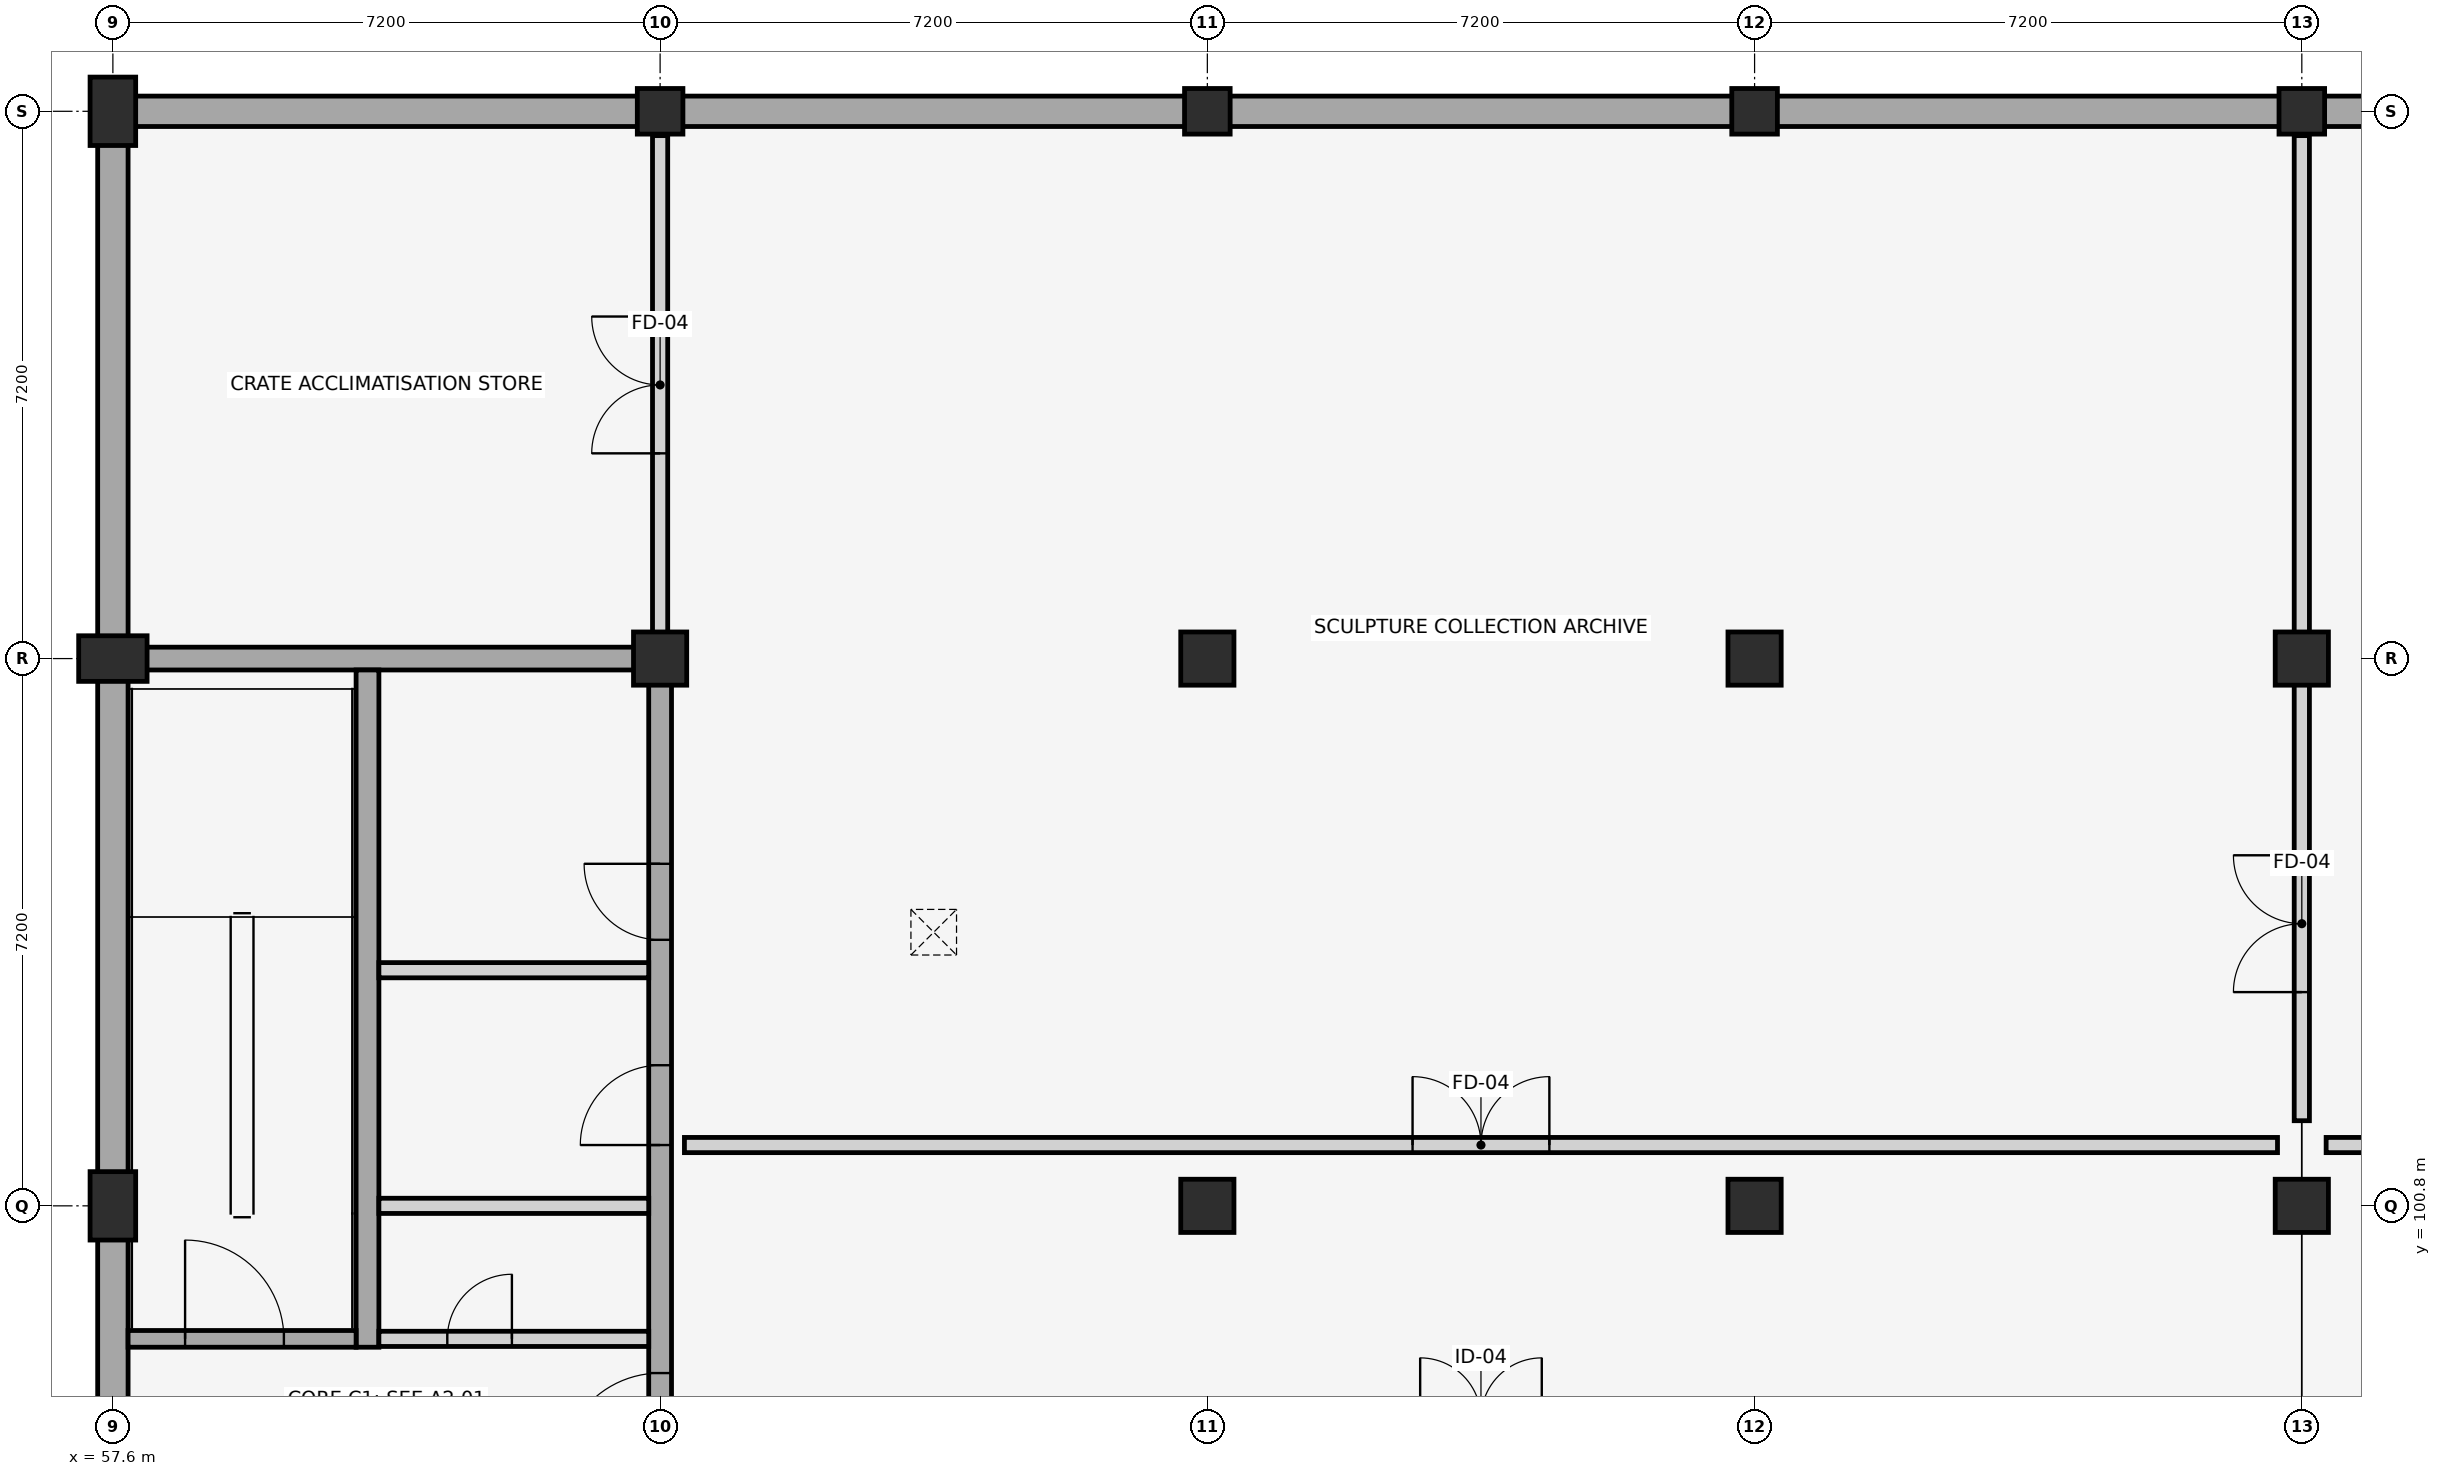
"""IFC4 building model, lengths in metres.
Left out: names, types, materials, properties, quantities, classifications, styles, units other than length and angle.
Written with IfcOpenShell. Run it as: python <this file> out.ifc"""

import sys

from ifc_helpers import new_model, si_unit, direction, frame, frame_2d, origin, origin_2d, place, context, subcontext, project, spatial, rectangle, extrude, element, fill, save


model = new_model("IFC4")
c1 = context("Model", 3, precision=1e-05, world=origin(), true_north=direction((0.0, 1.0)))
c2 = subcontext(c1, "Body", "Model", "MODEL_VIEW")
j1 = project(units=[si_unit("LENGTHUNIT", "METRE"), si_unit("PLANEANGLEUNIT", "RADIAN")], contexts=[c1])
p1 = place(None, origin())
s1 = spatial("IfcSite", under=j1, at=p1, CompositionType="ELEMENT")
p2 = place(p1, origin())
s2 = spatial("IfcBuilding", under=s1, at=p2, CompositionType="ELEMENT")
p3 = place(p2, frame((0.0, 0.0, -4.5)))
s3 = spatial("IfcBuildingStorey", under=s2, at=p3, CompositionType="ELEMENT", Elevation=-4.5)
p4 = place(p3, frame((108.2, 115.2, 0.0), z_axis=(0.0, 0.0, 1.0), x_axis=(-1.0, 0.0, 0.0)))
e1 = element("IfcWall", 1, at=p4, inside=s3, PredefinedType="USERDEFINED", context=c2, shape_type="SweptSolid", body=[
    extrude(rectangle(XDim=50.8, YDim=0.4, at=frame_2d((25.4, 0.0))), origin(), (0.0, 0.0, 1.0), 3.67),
])
p5 = place(p3, frame((57.6, 115.0, 0.0), z_axis=(0.0, 0.0, 1.0), x_axis=(0.0, -1.0, 0.0)))
e2 = element("IfcWall", 2, at=p5, inside=s3, PredefinedType="USERDEFINED", context=c2, shape_type="SweptSolid", body=[
    extrude(rectangle(XDim=28.4, YDim=0.4, at=frame_2d((14.2, 0.0))), origin(), (0.0, 0.0, 1.0), 3.67),
])
for number, where, z_axis, x_axis in (
    (3, (57.6, 100.8, -0.45), (0.0, 0.0, 1.0), (1.0, 0.0, 0.0)),
    (4, (57.6, 108.0, -0.45), (0.0, 0.0, 1.0), (0.0, 1.0, 0.0)),
    (5, (57.6, 115.2, -0.45), (0.0, 0.0, 1.0), (1.0, 0.0, 0.0)),
):
    element("IfcColumn", number, at=place(p3, frame(where, z_axis=z_axis, x_axis=x_axis)), inside=s3, PredefinedType="PILASTER", context=c2, shape_type="SweptSolid", body=[
        extrude(rectangle(XDim=0.6, YDim=0.9, at=origin_2d()), origin(), (0.0, 0.0, 1.0), 4.95),
    ])
p6 = place(p3, frame((64.8, 108.0, -0.45), z_axis=(0.0, 0.0, 1.0), x_axis=(1.0, 0.0, 0.0)))
e6 = element("IfcColumn", 6, at=p6, inside=s3, PredefinedType="COLUMN", context=c2, shape_type="SweptSolid", body=[
    extrude(rectangle(XDim=0.7, YDim=0.7, at=origin_2d()), origin(), (0.0, 0.0, 1.0), 4.95),
])
p7 = place(p3, frame((64.8, 115.2, -0.45), z_axis=(0.0, 0.0, 1.0), x_axis=(0.0, 1.0, 0.0)))
e7 = element("IfcColumn", 7, at=p7, inside=s3, PredefinedType="COLUMN", context=c2, shape_type="SweptSolid", body=[
    extrude(rectangle(XDim=0.6, YDim=0.6, at=origin_2d()), origin(), (0.0, 0.0, 1.0), 4.95),
])
for number, where, z_axis, x_axis in (
    (8, (72.0, 100.8, -0.45), (0.0, 0.0, 1.0), (1.0, 0.0, 0.0)),
    (9, (72.0, 108.0, -0.45), (0.0, 0.0, 1.0), (0.0, 1.0, 0.0)),
):
    element("IfcColumn", number, at=place(p3, frame(where, z_axis=z_axis, x_axis=x_axis)), inside=s3, PredefinedType="COLUMN", context=c2, shape_type="SweptSolid", body=[
        extrude(rectangle(XDim=0.7, YDim=0.7, at=origin_2d()), origin(), (0.0, 0.0, 1.0), 4.95),
    ])
p8 = place(p3, frame((72.0, 115.2, -0.45), z_axis=(0.0, 0.0, 1.0), x_axis=(1.0, 0.0, 0.0)))
e10 = element("IfcColumn", 10, at=p8, inside=s3, PredefinedType="COLUMN", context=c2, shape_type="SweptSolid", body=[
    extrude(rectangle(XDim=0.6, YDim=0.6, at=origin_2d()), origin(), (0.0, 0.0, 1.0), 4.95),
])
for number, where, z_axis, x_axis in (
    (11, (79.2, 100.8, -0.45), (0.0, 0.0, 1.0), (0.0, 1.0, 0.0)),
    (12, (79.2, 108.0, -0.45), (0.0, 0.0, 1.0), (1.0, 0.0, 0.0)),
):
    element("IfcColumn", number, at=place(p3, frame(where, z_axis=z_axis, x_axis=x_axis)), inside=s3, PredefinedType="COLUMN", context=c2, shape_type="SweptSolid", body=[
        extrude(rectangle(XDim=0.7, YDim=0.7, at=origin_2d()), origin(), (0.0, 0.0, 1.0), 4.95),
    ])
p9 = place(p3, frame((79.2, 115.2, -0.45), z_axis=(0.0, 0.0, 1.0), x_axis=(0.0, 1.0, 0.0)))
e13 = element("IfcColumn", 13, at=p9, inside=s3, PredefinedType="COLUMN", context=c2, shape_type="SweptSolid", body=[
    extrude(rectangle(XDim=0.6, YDim=0.6, at=origin_2d()), origin(), (0.0, 0.0, 1.0), 4.95),
])
for number, where, z_axis, x_axis in (
    (14, (86.4, 100.8, -0.45), (0.0, 0.0, 1.0), (1.0, 0.0, 0.0)),
    (15, (86.4, 108.0, -0.45), (0.0, 0.0, 1.0), (0.0, 1.0, 0.0)),
):
    element("IfcColumn", number, at=place(p3, frame(where, z_axis=z_axis, x_axis=x_axis)), inside=s3, PredefinedType="COLUMN", context=c2, shape_type="SweptSolid", body=[
        extrude(rectangle(XDim=0.7, YDim=0.7, at=origin_2d()), origin(), (0.0, 0.0, 1.0), 4.95),
    ])
p10 = place(p3, frame((86.4, 115.2, -0.45), z_axis=(0.0, 0.0, 1.0), x_axis=(1.0, 0.0, 0.0)))
e16 = element("IfcColumn", 16, at=p10, inside=s3, PredefinedType="COLUMN", context=c2, shape_type="SweptSolid", body=[
    extrude(rectangle(XDim=0.6, YDim=0.6, at=origin_2d()), origin(), (0.0, 0.0, 1.0), 4.95),
])
p11 = place(p3, frame((57.8, 108.0, 0.0), z_axis=(0.0, 0.0, 1.0), x_axis=(1.0, 0.0, 0.0)))
e17 = element("IfcWall", 17, at=p11, inside=s3, PredefinedType="SHEAR", context=c2, shape_type="SweptSolid", body=[
    extrude(rectangle(XDim=7.15, YDim=0.3, at=frame_2d((3.575, 0.0))), origin(), (0.0, 0.0, 1.0), 4.25),
])
p12 = place(p3, frame((64.8, 93.75, 0.0), z_axis=(0.0, 0.0, 1.0), x_axis=(0.0, 1.0, 0.0)))
e18 = element("IfcWall", 18, at=p12, inside=s3, PredefinedType="SHEAR", context=c2, shape_type="SweptSolid", body=[
    extrude(rectangle(XDim=14.1, YDim=0.3, at=frame_2d((7.05, 0.0))), origin(), (0.0, 0.0, 1.0), 4.25),
])
p13 = place(p12, frame((3.55, 0.0, 0.0)))
e19 = element("IfcOpeningElement", 19, at=p13, cuts=e18, PredefinedType="OPENING", context=c2, shape_type="SweptSolid", body=[
    extrude(rectangle(XDim=1.3, YDim=2.2, at=frame_2d((0.65, 1.1))), frame((0.0, 0.16, 0.0), z_axis=(0.0, -1.0, 0.0), x_axis=(1.0, 0.0, 0.0)), (0.0, 0.0, 1.0), 0.32),
])
p14 = place(p12, frame((7.85, 0.0, 0.0)))
e20 = element("IfcOpeningElement", 20, at=p14, cuts=e18, PredefinedType="OPENING", context=c2, shape_type="SweptSolid", body=[
    extrude(rectangle(XDim=1.05, YDim=2.15, at=frame_2d((0.525, 1.075))), frame((0.0, 0.16, 0.0), z_axis=(0.0, -1.0, 0.0), x_axis=(1.0, 0.0, 0.0)), (0.0, 0.0, 1.0), 0.32),
])
p15 = place(p12, frame((10.55, 0.0, 0.0)))
e21 = element("IfcOpeningElement", 21, at=p15, cuts=e18, PredefinedType="OPENING", context=c2, shape_type="SweptSolid", body=[
    extrude(rectangle(XDim=1.0, YDim=2.15, at=frame_2d((0.5, 1.075))), frame((0.0, 0.16, 0.0), z_axis=(0.0, -1.0, 0.0), x_axis=(1.0, 0.0, 0.0)), (0.0, 0.0, 1.0), 0.32),
])
p16 = place(p3, frame((60.95, 98.94, 0.0), z_axis=(0.0, 0.0, 1.0), x_axis=(0.0, 1.0, 0.0)))
e22 = element("IfcWall", 22, at=p16, inside=s3, PredefinedType="SHEAR", context=c2, shape_type="SweptSolid", body=[
    extrude(rectangle(XDim=8.91, YDim=0.3, at=frame_2d((4.455, 0.0))), origin(), (0.0, 0.0, 1.0), 4.25),
])
p17 = place(p3, frame((61.1, 99.05, 0.0), z_axis=(0.0, 0.0, 1.0), x_axis=(1.0, 0.0, 0.0)))
e23 = element("IfcWall", 23, at=p17, inside=s3, PredefinedType="PLUMBINGWALL", context=c2, shape_type="SweptSolid", body=[
    extrude(rectangle(XDim=3.55, YDim=0.2, at=frame_2d((1.775, 0.0))), origin(), (0.0, 0.0, 1.0), 3.67),
])
p18 = place(p17, frame((0.9, 0.0, 0.0)))
e24 = element("IfcOpeningElement", 24, at=p18, cuts=e23, PredefinedType="OPENING", context=c2, shape_type="SweptSolid", body=[
    extrude(rectangle(XDim=0.85, YDim=2.05, at=frame_2d((0.425, 1.025))), frame((0.0, 0.11, 0.0), z_axis=(0.0, -1.0, 0.0), x_axis=(1.0, 0.0, 0.0)), (0.0, 0.0, 1.0), 0.22),
])
p19 = place(p3, frame((57.8, 99.05, 0.0), z_axis=(0.0, 0.0, 1.0), x_axis=(1.0, 0.0, 0.0)))
e25 = element("IfcWall", 25, at=p19, inside=s3, PredefinedType="SHEAR", context=c2, shape_type="SweptSolid", body=[
    extrude(rectangle(XDim=3.0, YDim=0.22, at=frame_2d((1.5, 0.0))), origin(), (0.0, 0.0, 1.0), 4.25),
])
p20 = place(p19, frame((0.75, 0.0, 0.0)))
e26 = element("IfcOpeningElement", 26, at=p20, cuts=e25, PredefinedType="OPENING", context=c2, shape_type="SweptSolid", body=[
    extrude(rectangle(XDim=1.3, YDim=2.2, at=frame_2d((0.65, 1.1))), frame((0.0, 0.12, 0.0), z_axis=(0.0, -1.0, 0.0), x_axis=(1.0, 0.0, 0.0)), (0.0, 0.0, 1.0), 0.24),
])
for number, where, z_axis, x_axis in (
    (27, (61.1, 100.8, 0.0), (0.0, 0.0, 1.0), (1.0, 0.0, 0.0)),
    (28, (61.1, 103.9, 0.0), (0.0, 0.0, 1.0), (1.0, 0.0, 0.0)),
):
    element("IfcWall", number, at=place(p3, frame(where, z_axis=z_axis, x_axis=x_axis)), inside=s3, PredefinedType="PLUMBINGWALL", context=c2, shape_type="SweptSolid", body=[
        extrude(rectangle(XDim=3.55, YDim=0.2, at=frame_2d((1.775, 0.0))), origin(), (0.0, 0.0, 1.0), 3.67),
    ])
p21 = place(p3, frame((65.12, 101.6, 0.0), z_axis=(0.0, 0.0, 1.0), x_axis=(1.0, 0.0, 0.0)))
e29 = element("IfcWall", 29, at=p21, inside=s3, PredefinedType="PARTITIONING", context=c2, shape_type="SweptSolid", body=[
    extrude(rectangle(XDim=20.96, YDim=0.2, at=frame_2d((10.48, 0.0))), origin(), (0.0, 0.0, 1.0), 3.45),
])
p22 = place(p21, frame((9.58, 0.0, 0.0)))
e30 = element("IfcOpeningElement", 30, at=p22, cuts=e29, PredefinedType="OPENING", context=c2, shape_type="SweptSolid", body=[
    extrude(rectangle(XDim=1.8, YDim=2.4, at=frame_2d((0.9, 1.2))), frame((0.0, 0.11, 0.0), z_axis=(0.0, -1.0, 0.0), x_axis=(1.0, 0.0, 0.0)), (0.0, 0.0, 1.0), 0.22),
])
p23 = place(p3, frame((86.72, 101.6, 0.0), z_axis=(0.0, 0.0, 1.0), x_axis=(1.0, 0.0, 0.0)))
e31 = element("IfcWall", 31, at=p23, inside=s3, PredefinedType="PARTITIONING", context=c2, shape_type="SweptSolid", body=[
    extrude(rectangle(XDim=13.76, YDim=0.2, at=frame_2d((6.88, 0.0))), origin(), (0.0, 0.0, 1.0), 3.45),
])
p24 = place(p23, frame((1.702, 0.0, 0.0)))
e32 = element("IfcOpeningElement", 32, at=p24, cuts=e31, PredefinedType="OPENING", context=c2, shape_type="SweptSolid", body=[
    extrude(rectangle(XDim=1.6, YDim=2.35, at=frame_2d((0.8, 1.175))), frame((0.0, 0.11, 0.0), z_axis=(0.0, -1.0, 0.0), x_axis=(1.0, 0.0, 0.0)), (0.0, 0.0, 1.0), 0.22),
])
p25 = place(p3, frame((86.4, 101.92, 0.0), z_axis=(0.0, 0.0, 1.0), x_axis=(0.0, 1.0, 0.0)))
e33 = element("IfcWall", 33, at=p25, inside=s3, PredefinedType="PARTITIONING", context=c2, shape_type="SweptSolid", body=[
    extrude(rectangle(XDim=12.96, YDim=0.2, at=frame_2d((6.48, 0.0))), origin(), (0.0, 0.0, 1.0), 3.45),
])
p26 = place(p25, frame((1.692, 0.0, 0.0)))
e34 = element("IfcOpeningElement", 34, at=p26, cuts=e33, PredefinedType="OPENING", context=c2, shape_type="SweptSolid", body=[
    extrude(rectangle(XDim=1.8, YDim=2.4, at=frame_2d((0.9, 1.2))), frame((0.0, 0.11, 0.0), z_axis=(0.0, -1.0, 0.0), x_axis=(1.0, 0.0, 0.0)), (0.0, 0.0, 1.0), 0.22),
])
p27 = place(p3, frame((64.8, 108.32, 0.0), z_axis=(0.0, 0.0, 1.0), x_axis=(0.0, 1.0, 0.0)))
e35 = element("IfcWall", 35, at=p27, inside=s3, PredefinedType="PARTITIONING", context=c2, shape_type="SweptSolid", body=[
    extrude(rectangle(XDim=6.56, YDim=0.2, at=frame_2d((3.28, 0.0))), origin(), (0.0, 0.0, 1.0), 3.45),
])
p28 = place(p27, frame((2.38, 0.0, 0.0)))
e36 = element("IfcOpeningElement", 36, at=p28, cuts=e35, PredefinedType="OPENING", context=c2, shape_type="SweptSolid", body=[
    extrude(rectangle(XDim=1.8, YDim=2.4, at=frame_2d((0.9, 1.2))), frame((0.0, 0.11, 0.0), z_axis=(0.0, -1.0, 0.0), x_axis=(1.0, 0.0, 0.0)), (0.0, 0.0, 1.0), 0.22),
])
p29 = place(p13, origin())
e37 = element("IfcDoor", 37, at=p29, inside=s3, OperationType="SINGLE_SWING_LEFT", PredefinedType="DOOR", context=c2, shape_type="SweptSolid", body=[
    extrude(rectangle(XDim=1.3, YDim=2.2, at=frame_2d((0.65, 1.1))), frame((0.0, 0.025, 0.0), z_axis=(0.0, -1.0, 0.0), x_axis=(1.0, 0.0, 0.0)), (0.0, 0.0, 1.0), 0.05),
])
fill(e19, e37)
p30 = place(p14, origin())
e38 = element("IfcDoor", 38, at=p30, inside=s3, OperationType="SINGLE_SWING_LEFT", PredefinedType="DOOR", context=c2, shape_type="SweptSolid", body=[
    extrude(rectangle(XDim=1.05, YDim=2.15, at=frame_2d((0.525, 1.075))), frame((0.0, 0.025, 0.0), z_axis=(0.0, -1.0, 0.0), x_axis=(1.0, 0.0, 0.0)), (0.0, 0.0, 1.0), 0.05),
])
fill(e20, e38)
p31 = place(p15, origin())
e39 = element("IfcDoor", 39, at=p31, inside=s3, OperationType="SINGLE_SWING_RIGHT", PredefinedType="DOOR", context=c2, shape_type="SweptSolid", body=[
    extrude(rectangle(XDim=1.0, YDim=2.15, at=frame_2d((0.5, 1.075))), frame((0.0, 0.025, 0.0), z_axis=(0.0, -1.0, 0.0), x_axis=(1.0, 0.0, 0.0)), (0.0, 0.0, 1.0), 0.05),
])
fill(e21, e39)
p32 = place(p18, origin())
e40 = element("IfcDoor", 40, at=p32, inside=s3, OperationType="SINGLE_SWING_RIGHT", PredefinedType="TRAPDOOR", context=c2, shape_type="SweptSolid", body=[
    extrude(rectangle(XDim=0.85, YDim=2.05, at=frame_2d((0.425, 1.025))), frame((0.0, 0.025, 0.0), z_axis=(0.0, -1.0, 0.0), x_axis=(1.0, 0.0, 0.0)), (0.0, 0.0, 1.0), 0.05),
])
fill(e24, e40)
p33 = place(p20, origin())
e41 = element("IfcDoor", 41, at=p33, inside=s3, OperationType="SINGLE_SWING_LEFT", PredefinedType="DOOR", context=c2, shape_type="SweptSolid", body=[
    extrude(rectangle(XDim=1.3, YDim=2.2, at=frame_2d((0.65, 1.1))), frame((0.0, 0.025, 0.0), z_axis=(0.0, -1.0, 0.0), x_axis=(1.0, 0.0, 0.0)), (0.0, 0.0, 1.0), 0.05),
])
fill(e26, e41)
p34 = place(p22, origin())
e42 = element("IfcDoor", 42, at=p34, inside=s3, OperationType="DOUBLE_DOOR_SINGLE_SWING", PredefinedType="DOOR", context=c2, shape_type="SweptSolid", body=[
    extrude(rectangle(XDim=1.8, YDim=2.4, at=frame_2d((0.9, 1.2))), frame((0.0, 0.025, 0.0), z_axis=(0.0, -1.0, 0.0), x_axis=(1.0, 0.0, 0.0)), (0.0, 0.0, 1.0), 0.05),
])
fill(e30, e42)
p35 = place(p26, origin())
e43 = element("IfcDoor", 43, at=p35, inside=s3, OperationType="DOUBLE_DOOR_SINGLE_SWING", PredefinedType="DOOR", context=c2, shape_type="SweptSolid", body=[
    extrude(rectangle(XDim=1.8, YDim=2.4, at=frame_2d((0.9, 1.2))), frame((0.0, 0.025, 0.0), z_axis=(0.0, -1.0, 0.0), x_axis=(1.0, 0.0, 0.0)), (0.0, 0.0, 1.0), 0.05),
])
fill(e34, e43)
p36 = place(p28, origin())
e44 = element("IfcDoor", 44, at=p36, inside=s3, OperationType="DOUBLE_DOOR_SINGLE_SWING", PredefinedType="DOOR", context=c2, shape_type="SweptSolid", body=[
    extrude(rectangle(XDim=1.8, YDim=2.4, at=frame_2d((0.9, 1.2))), frame((0.0, 0.025, 0.0), z_axis=(0.0, -1.0, 0.0), x_axis=(1.0, 0.0, 0.0)), (0.0, 0.0, 1.0), 0.05),
])
fill(e36, e44)
save(model, sys.argv[1])
